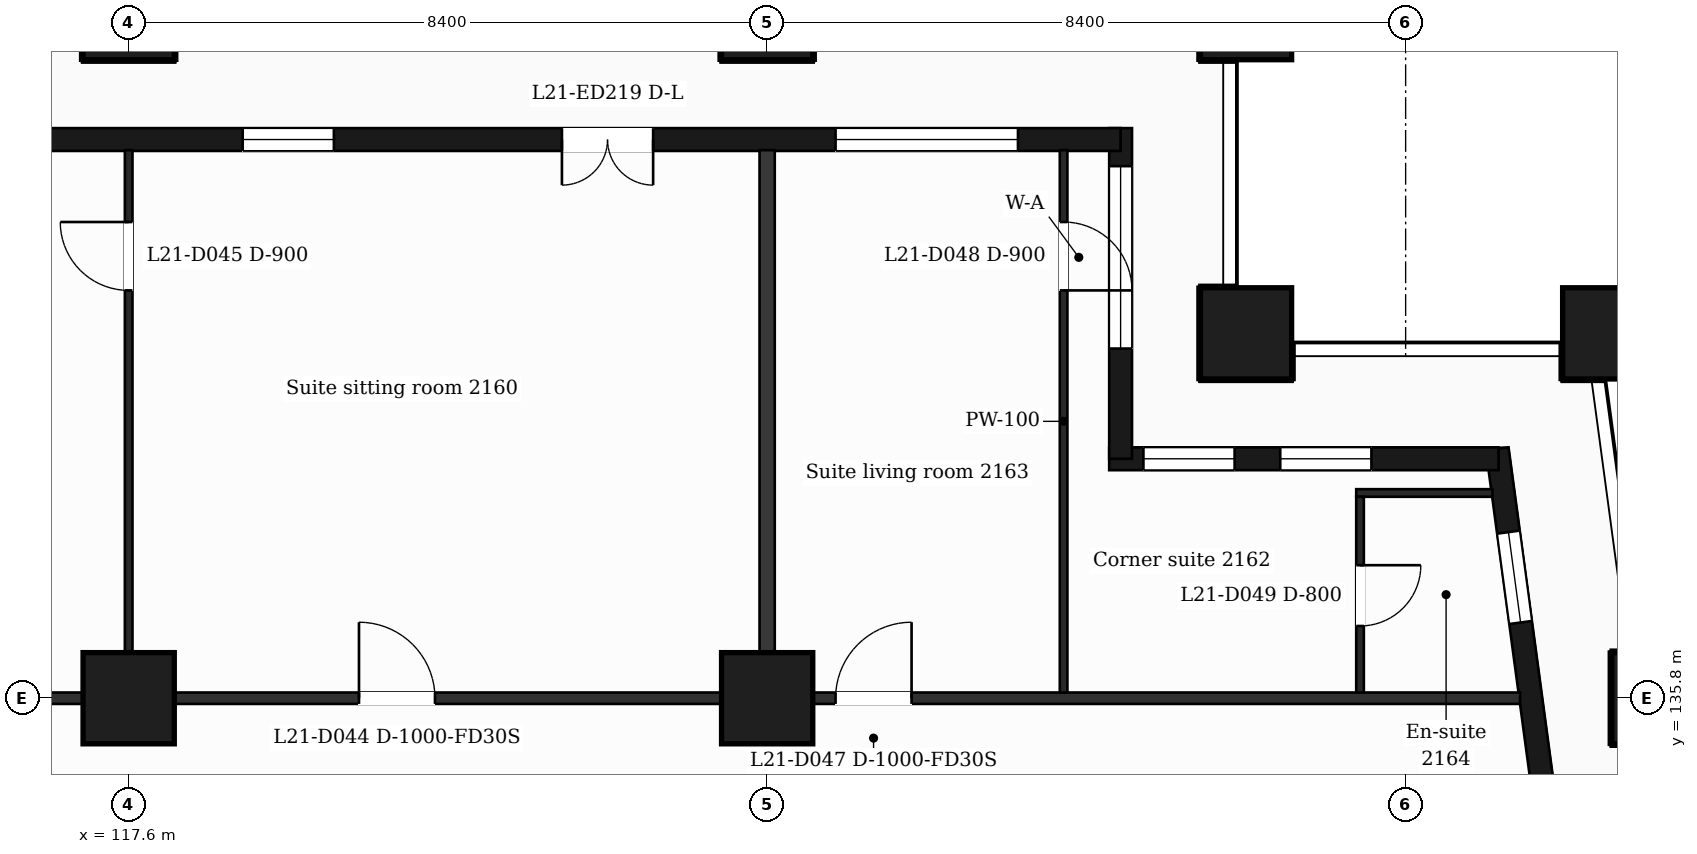
"""IFC4 building model, lengths in metres.
Left out: names, types, materials, properties, quantities, classifications, styles, units other than length and angle.
Written with IfcOpenShell. Run it as: python <this file> out.ifc"""

import sys

from ifc_helpers import new_model, si_unit, direction, frame, frame_2d, origin, origin_2d, place, context, subcontext, project, spatial, rectangle, extrude, element, fill, save


model = new_model("IFC4")
c1 = context("Model", 3, precision=1e-05, world=origin(), true_north=direction((0.0, 1.0)))
c2 = subcontext(c1, "Body", "Model", "MODEL_VIEW")
j1 = project(units=[si_unit("LENGTHUNIT", "METRE"), si_unit("PLANEANGLEUNIT", "RADIAN")], contexts=[c1])
p1 = place(None, origin())
s1 = spatial("IfcSite", under=j1, at=p1, CompositionType="ELEMENT")
p2 = place(p1, origin())
s2 = spatial("IfcBuilding", under=s1, at=p2, CompositionType="ELEMENT")
p3 = place(p2, frame((0.0, 0.0, 94.7)))
s3 = spatial("IfcBuildingStorey", under=s2, at=p3, CompositionType="ELEMENT", Elevation=94.7)
for number, where, z_axis, x_axis in (
    (1, (132.3, 140.6, 0.0), (0.0, 0.0, 1.0), (1.0, 0.0, 0.0)),
    (2, (137.065, 140.6, 0.0), (0.0, 0.0, 1.0), (1.0, 0.0, 0.0)),
    (3, (117.6, 135.8, 0.0), (0.0, 0.0, 1.0), (1.0, 0.0, 0.0)),
    (4, (126.0, 135.8, 0.0), (0.0, 0.0, 1.0), (1.0, 0.0, 0.0)),
    (5, (137.711, 135.8, 0.0), (0.0, 0.0, 1.0), (1.0, 0.0, 0.0)),
    (6, (117.6, 144.8, 0.0), (0.0, 0.0, 1.0), (1.0, 0.0, 0.0)),
    (7, (126.0, 144.8, 0.0), (0.0, 0.0, 1.0), (1.0, 0.0, 0.0)),
    (8, (132.3, 144.8, 0.0), (0.0, 0.0, 1.0), (1.0, 0.0, 0.0)),
):
    element("IfcColumn", number, at=place(p3, frame(where, z_axis=z_axis, x_axis=x_axis)), inside=s3, PredefinedType="COLUMN", context=c2, shape_type="SweptSolid", body=[
        extrude(rectangle(XDim=1.2, YDim=1.2, at=origin_2d()), origin(), (0.0, 0.0, 1.0), 3.7),
    ])
p4 = place(p3, frame((136.504, 132.4, 0.0), z_axis=(0.0, 0.0, 1.0), x_axis=(-0.133399697462, 0.99106231929, 0.0)))
e9 = element("IfcWall", 9, at=p4, inside=s3, PredefinedType="SOLIDWALL", context=c2, shape_type="SweptSolid", body=[
    extrude(rectangle(XDim=6.74, YDim=0.3, at=frame_2d((3.37, 0.0))), origin(), (0.0, 0.0, 1.0), 3.38),
])
p5 = place(p4, frame((1.115, 0.0, 0.0)))
e10 = element("IfcOpeningElement", 10, at=p5, cuts=e9, PredefinedType="OPENING", context=c2, shape_type="SweptSolid", body=[
    extrude(rectangle(XDim=1.2, YDim=2.4, at=frame_2d((0.6, 1.2))), frame((0.0, 0.16, 0.0), z_axis=(0.0, -1.0, 0.0), x_axis=(1.0, 0.0, 0.0)), (0.0, 0.0, 1.0), 0.32),
])
p6 = place(p4, frame((4.436, 0.0, 0.9)))
e11 = element("IfcOpeningElement", 11, at=p6, cuts=e9, PredefinedType="OPENING", context=c2, shape_type="SweptSolid", body=[
    extrude(rectangle(XDim=1.2, YDim=2.1, at=frame_2d((0.6, 1.05))), frame((0.0, 0.16, 0.0), z_axis=(0.0, -1.0, 0.0), x_axis=(1.0, 0.0, 0.0)), (0.0, 0.0, 1.0), 0.32),
])
p7 = place(p3, frame((135.623, 138.95, 0.0), z_axis=(0.0, 0.0, 1.0), x_axis=(-1.0, 0.0, 0.0)))
e12 = element("IfcWall", 12, at=p7, inside=s3, PredefinedType="SOLIDWALL", context=c2, shape_type="SweptSolid", body=[
    extrude(rectangle(XDim=5.123, YDim=0.3, at=frame_2d((2.561, 0.0))), origin(), (0.0, 0.0, 1.0), 3.38),
])
p8 = place(p7, frame((1.673, 0.0, 0.9)))
e13 = element("IfcOpeningElement", 13, at=p8, cuts=e12, PredefinedType="OPENING", context=c2, shape_type="SweptSolid", body=[
    extrude(rectangle(XDim=1.2, YDim=2.1, at=frame_2d((0.6, 1.05))), frame((0.0, 0.16, 0.0), z_axis=(0.0, -1.0, 0.0), x_axis=(1.0, 0.0, 0.0)), (0.0, 0.0, 1.0), 0.32),
])
p9 = place(p7, frame((3.473, 0.0, 0.9)))
e14 = element("IfcOpeningElement", 14, at=p9, cuts=e12, PredefinedType="OPENING", context=c2, shape_type="SweptSolid", body=[
    extrude(rectangle(XDim=1.2, YDim=2.1, at=frame_2d((0.6, 1.05))), frame((0.0, 0.16, 0.0), z_axis=(0.0, -1.0, 0.0), x_axis=(1.0, 0.0, 0.0)), (0.0, 0.0, 1.0), 0.32),
])
p10 = place(p3, frame((130.65, 138.95, 0.0), z_axis=(0.0, 0.0, 1.0), x_axis=(0.0, 1.0, 0.0)))
e15 = element("IfcWall", 15, at=p10, inside=s3, PredefinedType="SOLIDWALL", context=c2, shape_type="SweptSolid", body=[
    extrude(rectangle(XDim=4.35, YDim=0.3, at=frame_2d((2.175, 0.0))), origin(), (0.0, 0.0, 1.0), 3.38),
])
p11 = place(p10, frame((1.45, 0.0, 0.9)))
e16 = element("IfcOpeningElement", 16, at=p11, cuts=e15, PredefinedType="OPENING", context=c2, shape_type="SweptSolid", body=[
    extrude(rectangle(XDim=2.4, YDim=2.1, at=frame_2d((1.2, 1.05))), frame((0.0, 0.16, 0.0), z_axis=(0.0, -1.0, 0.0), x_axis=(1.0, 0.0, 0.0)), (0.0, 0.0, 1.0), 0.32),
])
p12 = place(p3, frame((130.65, 143.15, 0.0), z_axis=(0.0, 0.0, 1.0), x_axis=(-1.0, 0.0, 0.0)))
e17 = element("IfcWall", 17, at=p12, inside=s3, PredefinedType="SOLIDWALL", context=c2, shape_type="SweptSolid", body=[
    extrude(rectangle(XDim=14.25, YDim=0.3, at=frame_2d((7.125, 0.0))), origin(), (0.0, 0.0, 1.0), 3.38),
])
p13 = place(p12, frame((1.35, 0.0, 0.9)))
e18 = element("IfcOpeningElement", 18, at=p13, cuts=e17, PredefinedType="OPENING", context=c2, shape_type="SweptSolid", body=[
    extrude(rectangle(XDim=2.4, YDim=2.1, at=frame_2d((1.2, 1.05))), frame((0.0, 0.16, 0.0), z_axis=(0.0, -1.0, 0.0), x_axis=(1.0, 0.0, 0.0)), (0.0, 0.0, 1.0), 0.32),
])
p14 = place(p12, frame((6.15, 0.0, 0.0)))
e19 = element("IfcOpeningElement", 19, at=p14, cuts=e17, PredefinedType="OPENING", context=c2, shape_type="SweptSolid", body=[
    extrude(rectangle(XDim=1.2, YDim=2.4, at=frame_2d((0.6, 1.2))), frame((0.0, 0.16, 0.0), z_axis=(0.0, -1.0, 0.0), x_axis=(1.0, 0.0, 0.0)), (0.0, 0.0, 1.0), 0.32),
])
p15 = place(p12, frame((10.35, 0.0, 0.9)))
e20 = element("IfcOpeningElement", 20, at=p15, cuts=e17, PredefinedType="OPENING", context=c2, shape_type="SweptSolid", body=[
    extrude(rectangle(XDim=1.2, YDim=2.1, at=frame_2d((0.6, 1.05))), frame((0.0, 0.16, 0.0), z_axis=(0.0, -1.0, 0.0), x_axis=(1.0, 0.0, 0.0)), (0.0, 0.0, 1.0), 0.32),
])
p16 = place(p3, frame((90.895, 135.8, 0.0), z_axis=(0.0, 0.0, 1.0), x_axis=(1.0, 0.0, 0.0)))
e21 = element("IfcWall", 21, at=p16, inside=s3, PredefinedType="PARTITIONING", context=c2, shape_type="SweptSolid", body=[
    extrude(rectangle(XDim=45.011, YDim=0.15, at=frame_2d((22.505, 0.0))), origin(), (0.0, 0.0, 1.0), 3.38),
])
p17 = place(p16, frame((7.675, 0.0, 0.0)))
e22 = element("IfcOpeningElement", 22, at=p17, cuts=e21, PredefinedType="OPENING", context=c2, shape_type="SweptSolid", body=[
    extrude(rectangle(XDim=1.0, YDim=2.1, at=frame_2d((0.5, 1.05))), frame((0.0, 0.085, 0.0), z_axis=(0.0, -1.0, 0.0), x_axis=(1.0, 0.0, 0.0)), (0.0, 0.0, 1.0), 0.17),
])
p18 = place(p16, frame((15.281, 0.0, 0.0)))
e23 = element("IfcOpeningElement", 23, at=p18, cuts=e21, PredefinedType="OPENING", context=c2, shape_type="SweptSolid", body=[
    extrude(rectangle(XDim=1.0, YDim=2.1, at=frame_2d((0.5, 1.05))), frame((0.0, 0.085, 0.0), z_axis=(0.0, -1.0, 0.0), x_axis=(1.0, 0.0, 0.0)), (0.0, 0.0, 1.0), 0.17),
])
p19 = place(p16, frame((29.735, 0.0, 0.0)))
e24 = element("IfcOpeningElement", 24, at=p19, cuts=e21, PredefinedType="OPENING", context=c2, shape_type="SweptSolid", body=[
    extrude(rectangle(XDim=1.0, YDim=2.1, at=frame_2d((0.5, 1.05))), frame((0.0, 0.085, 0.0), z_axis=(0.0, -1.0, 0.0), x_axis=(1.0, 0.0, 0.0)), (0.0, 0.0, 1.0), 0.17),
])
p20 = place(p16, frame((36.005, 0.0, 0.0)))
e25 = element("IfcOpeningElement", 25, at=p20, cuts=e21, PredefinedType="OPENING", context=c2, shape_type="SweptSolid", body=[
    extrude(rectangle(XDim=1.0, YDim=2.1, at=frame_2d((0.5, 1.05))), frame((0.0, 0.085, 0.0), z_axis=(0.0, -1.0, 0.0), x_axis=(1.0, 0.0, 0.0)), (0.0, 0.0, 1.0), 0.17),
])
p21 = place(p3, frame((133.75, 138.5, 0.0), z_axis=(0.0, 0.0, 1.0), x_axis=(1.0, 0.0, 0.0)))
e26 = element("IfcWall", 26, at=p21, inside=s3, PredefinedType="PARTITIONING", context=c2, shape_type="SweptSolid", body=[
    extrude(rectangle(XDim=1.792, YDim=0.1, at=frame_2d((0.896, 0.0))), origin(), (0.0, 0.0, 1.0), 3.38),
])
p22 = place(p3, frame((117.6, 135.875, 0.0), z_axis=(0.0, 0.0, 1.0), x_axis=(0.0, 1.0, 0.0)))
e27 = element("IfcWall", 27, at=p22, inside=s3, PredefinedType="PARTITIONING", context=c2, shape_type="SweptSolid", body=[
    extrude(rectangle(XDim=7.135, YDim=0.1, at=frame_2d((3.567, 0.0))), origin(), (0.0, 0.0, 1.0), 3.38),
])
p23 = place(p22, frame((5.29, 0.0, 0.0)))
e28 = element("IfcOpeningElement", 28, at=p23, cuts=e27, PredefinedType="OPENING", context=c2, shape_type="SweptSolid", body=[
    extrude(rectangle(XDim=0.9, YDim=2.1, at=frame_2d((0.45, 1.05))), frame((0.0, 0.06, 0.0), z_axis=(0.0, -1.0, 0.0), x_axis=(1.0, 0.0, 0.0)), (0.0, 0.0, 1.0), 0.12),
])
p24 = place(p3, frame((126.0, 135.875, 0.0), z_axis=(0.0, 0.0, 1.0), x_axis=(0.0, 1.0, 0.0)))
e29 = element("IfcWall", 29, at=p24, inside=s3, PredefinedType="PARTITIONING", context=c2, shape_type="SweptSolid", body=[
    extrude(rectangle(XDim=7.135, YDim=0.2, at=frame_2d((3.567, 0.0))), origin(), (0.0, 0.0, 1.0), 3.38),
])
p25 = place(p3, frame((129.9, 135.875, 0.0), z_axis=(0.0, 0.0, 1.0), x_axis=(0.0, 1.0, 0.0)))
e30 = element("IfcWall", 30, at=p25, inside=s3, PredefinedType="PARTITIONING", context=c2, shape_type="SweptSolid", body=[
    extrude(rectangle(XDim=7.135, YDim=0.1, at=frame_2d((3.567, 0.0))), origin(), (0.0, 0.0, 1.0), 3.38),
])
p26 = place(p25, frame((5.29, 0.0, 0.0)))
e31 = element("IfcOpeningElement", 31, at=p26, cuts=e30, PredefinedType="OPENING", context=c2, shape_type="SweptSolid", body=[
    extrude(rectangle(XDim=0.9, YDim=2.1, at=frame_2d((0.45, 1.05))), frame((0.0, 0.06, 0.0), z_axis=(0.0, -1.0, 0.0), x_axis=(1.0, 0.0, 0.0)), (0.0, 0.0, 1.0), 0.12),
])
p27 = place(p3, frame((133.8, 135.875, 0.0), z_axis=(0.0, 0.0, 1.0), x_axis=(0.0, 1.0, 0.0)))
e32 = element("IfcWall", 32, at=p27, inside=s3, PredefinedType="PARTITIONING", context=c2, shape_type="SweptSolid", body=[
    extrude(rectangle(XDim=2.575, YDim=0.1, at=frame_2d((1.288, 0.0))), origin(), (0.0, 0.0, 1.0), 3.38),
])
p28 = place(p27, frame((0.875, 0.0, 0.0)))
e33 = element("IfcOpeningElement", 33, at=p28, cuts=e32, PredefinedType="OPENING", context=c2, shape_type="SweptSolid", body=[
    extrude(rectangle(XDim=0.8, YDim=2.1, at=frame_2d((0.4, 1.05))), frame((0.0, 0.06, 0.0), z_axis=(0.0, -1.0, 0.0), x_axis=(1.0, 0.0, 0.0)), (0.0, 0.0, 1.0), 0.12),
])
p29 = place(p6, origin())
e34 = element("IfcWindow", 34, at=p29, inside=s3, PartitioningType="SINGLE_PANEL", PredefinedType="WINDOW", context=c2, shape_type="SweptSolid", body=[
    extrude(rectangle(XDim=1.2, YDim=2.1, at=frame_2d((0.6, 1.05))), frame((0.0, 0.03, 0.0), z_axis=(0.0, -1.0, 0.0), x_axis=(1.0, 0.0, 0.0)), (0.0, 0.0, 1.0), 0.06),
])
fill(e11, e34)
p30 = place(p8, origin())
e35 = element("IfcWindow", 35, at=p30, inside=s3, PartitioningType="SINGLE_PANEL", PredefinedType="WINDOW", context=c2, shape_type="SweptSolid", body=[
    extrude(rectangle(XDim=1.2, YDim=2.1, at=frame_2d((0.6, 1.05))), frame((0.0, 0.03, 0.0), z_axis=(0.0, -1.0, 0.0), x_axis=(1.0, 0.0, 0.0)), (0.0, 0.0, 1.0), 0.06),
])
fill(e13, e35)
p31 = place(p9, origin())
e36 = element("IfcWindow", 36, at=p31, inside=s3, PartitioningType="SINGLE_PANEL", PredefinedType="WINDOW", context=c2, shape_type="SweptSolid", body=[
    extrude(rectangle(XDim=1.2, YDim=2.1, at=frame_2d((0.6, 1.05))), frame((0.0, 0.03, 0.0), z_axis=(0.0, -1.0, 0.0), x_axis=(1.0, 0.0, 0.0)), (0.0, 0.0, 1.0), 0.06),
])
fill(e14, e36)
p32 = place(p11, origin())
e37 = element("IfcWindow", 37, at=p32, inside=s3, PartitioningType="SINGLE_PANEL", PredefinedType="WINDOW", context=c2, shape_type="SweptSolid", body=[
    extrude(rectangle(XDim=2.4, YDim=2.1, at=frame_2d((1.2, 1.05))), frame((0.0, 0.03, 0.0), z_axis=(0.0, -1.0, 0.0), x_axis=(1.0, 0.0, 0.0)), (0.0, 0.0, 1.0), 0.06),
])
fill(e16, e37)
p33 = place(p13, origin())
e38 = element("IfcWindow", 38, at=p33, inside=s3, PartitioningType="SINGLE_PANEL", PredefinedType="WINDOW", context=c2, shape_type="SweptSolid", body=[
    extrude(rectangle(XDim=2.4, YDim=2.1, at=frame_2d((1.2, 1.05))), frame((0.0, 0.03, 0.0), z_axis=(0.0, -1.0, 0.0), x_axis=(1.0, 0.0, 0.0)), (0.0, 0.0, 1.0), 0.06),
])
fill(e18, e38)
p34 = place(p14, origin())
e39 = element("IfcDoor", 39, at=p34, inside=s3, OperationType="DOUBLE_DOOR_SINGLE_SWING", PredefinedType="DOOR", context=c2, shape_type="SweptSolid", body=[
    extrude(rectangle(XDim=1.2, YDim=2.4, at=frame_2d((0.6, 1.2))), frame((0.0, 0.025, 0.0), z_axis=(0.0, -1.0, 0.0), x_axis=(1.0, 0.0, 0.0)), (0.0, 0.0, 1.0), 0.05),
])
fill(e19, e39)
p35 = place(p15, origin())
e40 = element("IfcWindow", 40, at=p35, inside=s3, PartitioningType="SINGLE_PANEL", PredefinedType="WINDOW", context=c2, shape_type="SweptSolid", body=[
    extrude(rectangle(XDim=1.2, YDim=2.1, at=frame_2d((0.6, 1.05))), frame((0.0, 0.03, 0.0), z_axis=(0.0, -1.0, 0.0), x_axis=(1.0, 0.0, 0.0)), (0.0, 0.0, 1.0), 0.06),
])
fill(e20, e40)
p36 = place(p19, origin())
e41 = element("IfcDoor", 41, at=p36, inside=s3, OperationType="SINGLE_SWING_LEFT", PredefinedType="DOOR", context=c2, shape_type="SweptSolid", body=[
    extrude(rectangle(XDim=1.0, YDim=2.1, at=frame_2d((0.5, 1.05))), frame((0.0, 0.025, 0.0), z_axis=(0.0, -1.0, 0.0), x_axis=(1.0, 0.0, 0.0)), (0.0, 0.0, 1.0), 0.05),
])
fill(e24, e41)
p37 = place(p23, origin())
e42 = element("IfcDoor", 42, at=p37, inside=s3, OperationType="SINGLE_SWING_RIGHT", PredefinedType="DOOR", context=c2, shape_type="SweptSolid", body=[
    extrude(rectangle(XDim=0.9, YDim=2.1, at=frame_2d((0.45, 1.05))), frame((0.0, 0.025, 0.0), z_axis=(0.0, -1.0, 0.0), x_axis=(1.0, 0.0, 0.0)), (0.0, 0.0, 1.0), 0.05),
])
fill(e28, e42)
p38 = place(p20, origin())
e43 = element("IfcDoor", 43, at=p38, inside=s3, OperationType="SINGLE_SWING_RIGHT", PredefinedType="DOOR", context=c2, shape_type="SweptSolid", body=[
    extrude(rectangle(XDim=1.0, YDim=2.1, at=frame_2d((0.5, 1.05))), frame((0.0, 0.025, 0.0), z_axis=(0.0, -1.0, 0.0), x_axis=(1.0, 0.0, 0.0)), (0.0, 0.0, 1.0), 0.05),
])
fill(e25, e43)
p39 = place(p26, origin())
e44 = element("IfcDoor", 44, at=p39, inside=s3, OperationType="SINGLE_SWING_LEFT", PredefinedType="DOOR", context=c2, shape_type="SweptSolid", body=[
    extrude(rectangle(XDim=0.9, YDim=2.1, at=frame_2d((0.45, 1.05))), frame((0.0, 0.025, 0.0), z_axis=(0.0, -1.0, 0.0), x_axis=(1.0, 0.0, 0.0)), (0.0, 0.0, 1.0), 0.05),
])
fill(e31, e44)
p40 = place(p28, origin())
e45 = element("IfcDoor", 45, at=p40, inside=s3, OperationType="SINGLE_SWING_RIGHT", PredefinedType="DOOR", context=c2, shape_type="SweptSolid", body=[
    extrude(rectangle(XDim=0.8, YDim=2.1, at=frame_2d((0.4, 1.05))), frame((0.0, 0.025, 0.0), z_axis=(0.0, -1.0, 0.0), x_axis=(1.0, 0.0, 0.0)), (0.0, 0.0, 1.0), 0.05),
])
fill(e33, e45)
save(model, sys.argv[1])
